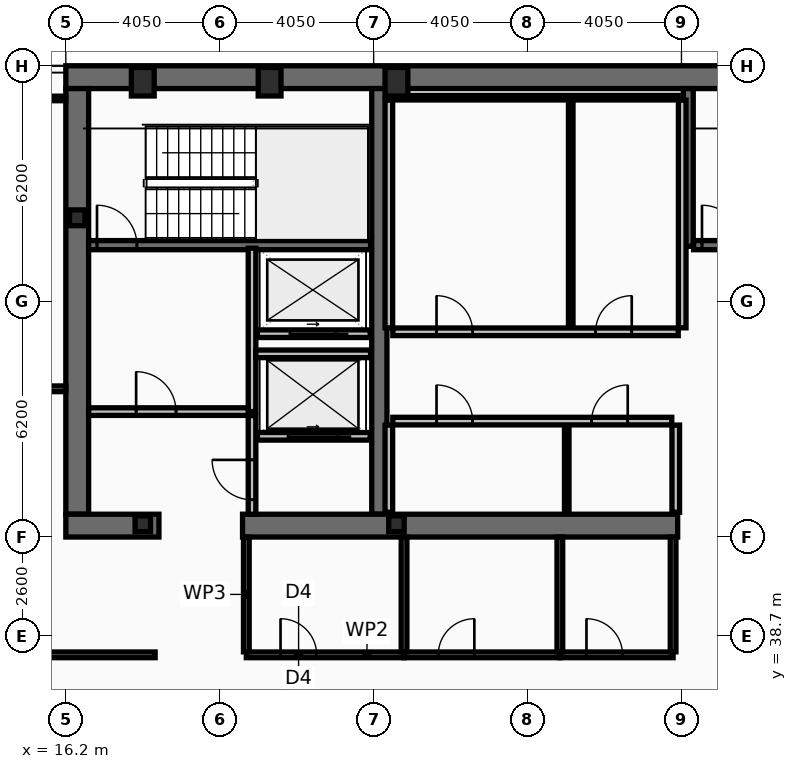
"""IFC4 building model, lengths in metres.
Left out: names, types, materials, properties, quantities, classifications, styles, units other than length and angle.
Written with IfcOpenShell. Run it as: python <this file> out.ifc"""

import sys

from ifc_helpers import new_model, si_unit, direction, frame, frame_2d, origin, origin_2d, place, context, subcontext, project, spatial, rectangle, hollow_rectangle, i_section, extrude, element, fill, save


model = new_model("IFC4")
c1 = context("Model", 3, precision=1e-05, world=origin(), true_north=direction((0.0, 1.0)))
c2 = subcontext(c1, "Body", "Model", "MODEL_VIEW")
j1 = project(units=[si_unit("LENGTHUNIT", "METRE"), si_unit("PLANEANGLEUNIT", "RADIAN")], contexts=[c1])
p1 = place(None, origin())
s1 = spatial("IfcSite", under=j1, at=p1, CompositionType="ELEMENT")
p2 = place(p1, origin())
s2 = spatial("IfcBuilding", under=s1, at=p2, CompositionType="ELEMENT")
p3 = place(p2, frame((0.0, 0.0, 206.6)))
s3 = spatial("IfcBuildingStorey", under=s2, at=p3, CompositionType="ELEMENT", Elevation=206.6)
p4 = place(p3, frame((16.2, 53.4, 0.0), z_axis=(0.0, 0.0, 1.0), x_axis=(1.0, 0.0, 0.0)))
e1 = element("IfcWall", 1, at=p4, inside=s3, PredefinedType="SHEAR", context=c2, shape_type="SweptSolid", body=[
    extrude(rectangle(XDim=40.5, YDim=0.6, at=frame_2d((20.25, 0.0))), origin(), (0.0, 0.0, 1.0), 3.44),
])
p5 = place(p3, frame((16.5, 41.9, 0.0), z_axis=(0.0, 0.0, 1.0), x_axis=(0.0, 1.0, 0.0)))
e2 = element("IfcWall", 2, at=p5, inside=s3, PredefinedType="SHEAR", context=c2, shape_type="SweptSolid", body=[
    extrude(rectangle(XDim=11.2, YDim=0.6, at=frame_2d((5.6, 0.0))), origin(), (0.0, 0.0, 1.0), 3.44),
])
p6 = place(p3, frame((24.45, 41.9, 0.0), z_axis=(0.0, 0.0, 1.0), x_axis=(0.0, 1.0, 0.0)))
e3 = element("IfcWall", 3, at=p6, inside=s3, PredefinedType="SHEAR", context=c2, shape_type="SweptSolid", body=[
    extrude(rectangle(XDim=11.2, YDim=0.4, at=frame_2d((5.6, 0.0))), origin(), (0.0, 0.0, 1.0), 3.44),
])
p7 = place(p3, frame((18.65, 41.6, 0.0), z_axis=(0.0, 0.0, 1.0), x_axis=(-1.0, 0.0, 0.0)))
e4 = element("IfcWall", 4, at=p7, inside=s3, PredefinedType="SHEAR", context=c2, shape_type="SweptSolid", body=[
    extrude(rectangle(XDim=2.45, YDim=0.6, at=frame_2d((1.225, 0.0))), origin(), (0.0, 0.0, 1.0), 3.44),
])
p8 = place(p3, frame((32.3, 41.6, 0.0), z_axis=(0.0, 0.0, 1.0), x_axis=(-1.0, 0.0, 0.0)))
e5 = element("IfcWall", 5, at=p8, inside=s3, PredefinedType="SHEAR", context=c2, shape_type="SweptSolid", body=[
    extrude(rectangle(XDim=11.45, YDim=0.6, at=frame_2d((5.725, 0.0))), origin(), (0.0, 0.0, 1.0), 3.44),
])
p9 = place(p3, frame((32.58, 48.95, 0.0), z_axis=(0.0, 0.0, 1.0), x_axis=(0.0, 1.0, 0.0)))
e6 = element("IfcWall", 6, at=p9, inside=s3, PredefinedType="SHEAR", context=c2, shape_type="SweptSolid", body=[
    extrude(rectangle(XDim=4.15, YDim=0.26, at=frame_2d((2.075, 0.0))), origin(), (0.0, 0.0, 1.0), 3.44),
])
p10 = place(p3, frame((16.8, 48.98, 0.0), z_axis=(0.0, 0.0, 1.0), x_axis=(1.0, 0.0, 0.0)))
e7 = element("IfcWall", 7, at=p10, inside=s3, PredefinedType="SHEAR", context=c2, shape_type="SweptSolid", body=[
    extrude(rectangle(XDim=7.42, YDim=0.24, at=frame_2d((3.71, 0.0))), origin(), (0.0, 0.0, 1.0), 3.44),
])
p11 = place(p10, frame((0.22, 0.0, 0.0)))
e8 = element("IfcOpeningElement", 8, at=p11, cuts=e7, PredefinedType="OPENING", context=c2, shape_type="SweptSolid", body=[
    extrude(rectangle(XDim=1.05, YDim=2.15, at=frame_2d((0.525, 1.075))), frame((0.0, 0.13, 0.0), z_axis=(0.0, -1.0, 0.0), x_axis=(1.0, 0.0, 0.0)), (0.0, 0.0, 1.0), 0.26),
])
p12 = place(p3, frame((32.72, 48.98, 0.0), z_axis=(0.0, 0.0, 1.0), x_axis=(1.0, 0.0, 0.0)))
e9 = element("IfcWall", 9, at=p12, inside=s3, PredefinedType="SHEAR", context=c2, shape_type="SweptSolid", body=[
    extrude(rectangle(XDim=7.56, YDim=0.24, at=frame_2d((3.78, 0.0))), origin(), (0.0, 0.0, 1.0), 3.44),
])
p13 = place(p12, frame((0.22, 0.0, 0.0)))
e10 = element("IfcOpeningElement", 10, at=p13, cuts=e9, PredefinedType="OPENING", context=c2, shape_type="SweptSolid", body=[
    extrude(rectangle(XDim=1.05, YDim=2.15, at=frame_2d((0.525, 1.075))), frame((0.0, 0.13, 0.0), z_axis=(0.0, -1.0, 0.0), x_axis=(1.0, 0.0, 0.0)), (0.0, 0.0, 1.0), 0.26),
])
for number, where, z_axis, x_axis in (
    (11, (18.225, 53.28, 0.0), (0.0, 0.0, 1.0), (1.0, 0.0, 0.0)),
    (12, (21.562, 53.28, 0.0), (0.0, 0.0, 1.0), (1.0, 0.0, 0.0)),
    (13, (24.9, 53.28, 0.0), (0.0, 0.0, 1.0), (1.0, 0.0, 0.0)),
):
    element("IfcColumn", number, at=place(p3, frame(where, z_axis=z_axis, x_axis=x_axis)), inside=s3, PredefinedType="COLUMN", context=c2, shape_type="SweptSolid", body=[
        extrude(hollow_rectangle(XDim=0.6, YDim=0.75, WallThickness=0.045, at=origin_2d()), origin(), (0.0, 0.0, 1.0), 3.6),
    ])
for number, where, z_axis, x_axis in (
    (14, (16.5, 49.7, 0.0), (0.0, 0.0, 1.0), (1.0, 0.0, 0.0)),
    (15, (18.225, 41.65, 0.0), (0.0, 0.0, 1.0), (1.0, 0.0, 0.0)),
    (16, (24.9, 41.65, 0.0), (0.0, 0.0, 1.0), (1.0, 0.0, 0.0)),
):
    element("IfcColumn", number, at=place(p3, frame(where, z_axis=z_axis, x_axis=x_axis)), inside=s3, PredefinedType="COLUMN", context=c2, shape_type="SweptSolid", body=[
        extrude(i_section(OverallWidth=0.406, OverallDepth=0.416, WebThickness=0.03, FlangeThickness=0.048, at=origin_2d()), origin(), (0.0, 0.0, 1.0), 3.6),
    ])
p14 = place(p3, frame((24.21, 43.95, 0.0), z_axis=(0.0, 0.0, 1.0), x_axis=(-1.0, 0.0, 0.0)))
e17 = element("IfcWall", 17, at=p14, inside=s3, PredefinedType="PARTITIONING", context=c2, shape_type="SweptSolid", body=[
    extrude(rectangle(XDim=2.97, YDim=0.2, at=frame_2d((1.485, 0.0))), origin(), (0.0, 0.0, 1.0), 3.44),
])
p15 = place(p14, frame((0.86, 0.0, 0.0)))
e18 = element("IfcOpeningElement", 18, at=p15, cuts=e17, PredefinedType="OPENING", context=c2, shape_type="SweptSolid", body=[
    extrude(rectangle(XDim=1.3, YDim=2.18, at=frame_2d((0.65, 1.09))), frame((0.0, 0.11, 0.0), z_axis=(0.0, -1.0, 0.0), x_axis=(1.0, 0.0, 0.0)), (0.0, 0.0, 1.0), 0.22),
])
p16 = place(p3, frame((24.21, 46.65, 0.0), z_axis=(0.0, 0.0, 1.0), x_axis=(-1.0, 0.0, 0.0)))
e19 = element("IfcWall", 19, at=p16, inside=s3, PredefinedType="PARTITIONING", context=c2, shape_type="SweptSolid", body=[
    extrude(rectangle(XDim=2.97, YDim=0.2, at=frame_2d((1.485, 0.0))), origin(), (0.0, 0.0, 1.0), 3.44),
])
p17 = place(p16, frame((0.91, 0.0, 0.0)))
e20 = element("IfcOpeningElement", 20, at=p17, cuts=e19, PredefinedType="OPENING", context=c2, shape_type="SweptSolid", body=[
    extrude(rectangle(XDim=1.2, YDim=2.18, at=frame_2d((0.6, 1.09))), frame((0.0, 0.11, 0.0), z_axis=(0.0, -1.0, 0.0), x_axis=(1.0, 0.0, 0.0)), (0.0, 0.0, 1.0), 0.22),
])
p18 = place(p3, frame((21.1, 44.6, 0.0), z_axis=(0.0, 0.0, 1.0), x_axis=(0.0, 1.0, 0.0)))
e21 = element("IfcWall", 21, at=p18, inside=s3, PredefinedType="PARTITIONING", context=c2, shape_type="SweptSolid", body=[
    extrude(rectangle(XDim=4.3, YDim=0.2, at=frame_2d((2.15, 0.0))), origin(), (0.0, 0.0, 1.0), 3.44),
])
p19 = place(p3, frame((16.8, 44.6, 0.0), z_axis=(0.0, 0.0, 1.0), x_axis=(1.0, 0.0, 0.0)))
e22 = element("IfcWall", 22, at=p19, inside=s3, PredefinedType="PARTITIONING", context=c2, shape_type="SweptSolid", body=[
    extrude(rectangle(XDim=4.2, YDim=0.2, at=frame_2d((2.1, 0.0))), origin(), (0.0, 0.0, 1.0), 3.44),
])
p20 = place(p19, frame((1.25, 0.0, 0.0)))
e23 = element("IfcOpeningElement", 23, at=p20, cuts=e22, PredefinedType="OPENING", context=c2, shape_type="SweptSolid", body=[
    extrude(rectangle(XDim=1.05, YDim=2.15, at=frame_2d((0.525, 1.075))), frame((0.0, 0.11, 0.0), z_axis=(0.0, -1.0, 0.0), x_axis=(1.0, 0.0, 0.0)), (0.0, 0.0, 1.0), 0.22),
])
p21 = place(p3, frame((21.2, 46.12, 0.0), z_axis=(0.0, 0.0, 1.0), x_axis=(1.0, 0.0, 0.0)))
e24 = element("IfcWall", 24, at=p21, inside=s3, PredefinedType="PARTITIONING", context=c2, shape_type="SweptSolid", body=[
    extrude(rectangle(XDim=3.02, YDim=0.2, at=frame_2d((1.51, 0.0))), origin(), (0.0, 0.0, 1.0), 3.44),
])
p22 = place(p3, frame((21.1, 41.9, 0.0), z_axis=(0.0, 0.0, 1.0), x_axis=(0.0, 1.0, 0.0)))
e25 = element("IfcWall", 25, at=p22, inside=s3, PredefinedType="PARTITIONING", context=c2, shape_type="SweptSolid", body=[
    extrude(rectangle(XDim=2.595, YDim=0.2, at=frame_2d((1.298, 0.0))), origin(), (0.0, 0.0, 1.0), 3.44),
])
p23 = place(p22, frame((0.38, 0.0, 0.0)))
e26 = element("IfcOpeningElement", 26, at=p23, cuts=e25, PredefinedType="OPENING", context=c2, shape_type="SweptSolid", body=[
    extrude(rectangle(XDim=1.05, YDim=2.15, at=frame_2d((0.525, 1.075))), frame((0.0, 0.11, 0.0), z_axis=(0.0, -1.0, 0.0), x_axis=(1.0, 0.0, 0.0)), (0.0, 0.0, 1.0), 0.22),
])
for number, where, z_axis, x_axis in (
    (27, (24.7, 46.805, 0.0), (0.0, 0.0, 1.0), (0.0, 1.0, 0.0)),
    (28, (32.42, 46.805, 0.0), (0.0, 0.0, 1.0), (0.0, 1.0, 0.0)),
):
    element("IfcWall", number, at=place(p3, frame(where, z_axis=z_axis, x_axis=x_axis)), inside=s3, PredefinedType="PARTITIONING", context=c2, shape_type="SweptSolid", body=[
        extrude(rectangle(XDim=5.99, YDim=0.2, at=frame_2d((2.995, 0.0))), origin(), (0.0, 0.0, 1.0), 3.44),
    ])
p24 = place(p3, frame((24.805, 52.86, 0.0), z_axis=(0.0, 0.0, 1.0), x_axis=(1.0, 0.0, 0.0)))
e29 = element("IfcWall", 29, at=p24, inside=s3, PredefinedType="PARTITIONING", context=c2, shape_type="SweptSolid", body=[
    extrude(rectangle(XDim=7.51, YDim=0.12, at=frame_2d((3.755, 0.0))), origin(), (0.0, 0.0, 1.0), 3.44),
])
p25 = place(p3, frame((29.486, 46.805, 0.0), z_axis=(0.0, 0.0, 1.0), x_axis=(0.0, 1.0, 0.0)))
e30 = element("IfcWall", 30, at=p25, inside=s3, PredefinedType="PARTITIONING", context=c2, shape_type="SweptSolid", body=[
    extrude(rectangle(XDim=5.99, YDim=0.12, at=frame_2d((2.995, 0.0))), origin(), (0.0, 0.0, 1.0), 3.44),
])
p26 = place(p3, frame((24.805, 46.7, 0.0), z_axis=(0.0, 0.0, 1.0), x_axis=(1.0, 0.0, 0.0)))
e31 = element("IfcWall", 31, at=p26, inside=s3, PredefinedType="PARTITIONING", context=c2, shape_type="SweptSolid", body=[
    extrude(rectangle(XDim=7.51, YDim=0.2, at=frame_2d((3.755, 0.0))), origin(), (0.0, 0.0, 1.0), 3.44),
])
p27 = place(p26, frame((1.15, 0.0, 0.0)))
e32 = element("IfcOpeningElement", 32, at=p27, cuts=e31, PredefinedType="OPENING", context=c2, shape_type="SweptSolid", body=[
    extrude(rectangle(XDim=0.95, YDim=2.1, at=frame_2d((0.475, 1.05))), frame((0.0, 0.11, 0.0), z_axis=(0.0, -1.0, 0.0), x_axis=(1.0, 0.0, 0.0)), (0.0, 0.0, 1.0), 0.22),
])
p28 = place(p26, frame((5.336, 0.0, 0.0)))
e33 = element("IfcOpeningElement", 33, at=p28, cuts=e31, PredefinedType="OPENING", context=c2, shape_type="SweptSolid", body=[
    extrude(rectangle(XDim=0.95, YDim=2.1, at=frame_2d((0.475, 1.05))), frame((0.0, 0.11, 0.0), z_axis=(0.0, -1.0, 0.0), x_axis=(1.0, 0.0, 0.0)), (0.0, 0.0, 1.0), 0.22),
])
for number, where, z_axis, x_axis in (
    (34, (24.7, 41.95, 0.0), (0.0, 0.0, 1.0), (0.0, 1.0, 0.0)),
    (35, (32.25, 41.95, 0.0), (0.0, 0.0, 1.0), (0.0, 1.0, 0.0)),
):
    element("IfcWall", number, at=place(p3, frame(where, z_axis=z_axis, x_axis=x_axis)), inside=s3, PredefinedType="PARTITIONING", context=c2, shape_type="SweptSolid", body=[
        extrude(rectangle(XDim=2.295, YDim=0.2, at=frame_2d((1.147, 0.0))), origin(), (0.0, 0.0, 1.0), 3.44),
    ])
p29 = place(p3, frame((29.381, 41.95, 0.0), z_axis=(0.0, 0.0, 1.0), x_axis=(0.0, 1.0, 0.0)))
e36 = element("IfcWall", 36, at=p29, inside=s3, PredefinedType="PARTITIONING", context=c2, shape_type="SweptSolid", body=[
    extrude(rectangle(XDim=2.295, YDim=0.12, at=frame_2d((1.147, 0.0))), origin(), (0.0, 0.0, 1.0), 3.44),
])
p30 = place(p3, frame((24.805, 44.35, 0.0), z_axis=(0.0, 0.0, 1.0), x_axis=(1.0, 0.0, 0.0)))
e37 = element("IfcWall", 37, at=p30, inside=s3, PredefinedType="PARTITIONING", context=c2, shape_type="SweptSolid", body=[
    extrude(rectangle(XDim=7.34, YDim=0.2, at=frame_2d((3.67, 0.0))), origin(), (0.0, 0.0, 1.0), 3.44),
])
p31 = place(p30, frame((1.15, 0.0, 0.0)))
e38 = element("IfcOpeningElement", 38, at=p31, cuts=e37, PredefinedType="OPENING", context=c2, shape_type="SweptSolid", body=[
    extrude(rectangle(XDim=0.95, YDim=2.1, at=frame_2d((0.475, 1.05))), frame((0.0, 0.11, 0.0), z_axis=(0.0, -1.0, 0.0), x_axis=(1.0, 0.0, 0.0)), (0.0, 0.0, 1.0), 0.22),
])
p32 = place(p30, frame((5.231, 0.0, 0.0)))
e39 = element("IfcOpeningElement", 39, at=p32, cuts=e37, PredefinedType="OPENING", context=c2, shape_type="SweptSolid", body=[
    extrude(rectangle(XDim=0.95, YDim=2.1, at=frame_2d((0.475, 1.05))), frame((0.0, 0.11, 0.0), z_axis=(0.0, -1.0, 0.0), x_axis=(1.0, 0.0, 0.0)), (0.0, 0.0, 1.0), 0.22),
])
p33 = place(p3, frame((20.95, 38.2, 0.0), z_axis=(0.0, 0.0, 1.0), x_axis=(1.0, 0.0, 0.0)))
e40 = element("IfcWall", 40, at=p33, inside=s3, PredefinedType="PARTITIONING", context=c2, shape_type="SweptSolid", body=[
    extrude(rectangle(XDim=4.15, YDim=0.15, at=frame_2d((2.075, 0.0))), origin(), (0.0, 0.0, 1.0), 2.73),
])
p34 = place(p33, frame((0.9, 0.0, 0.0)))
e41 = element("IfcOpeningElement", 41, at=p34, cuts=e40, PredefinedType="OPENING", context=c2, shape_type="SweptSolid", body=[
    extrude(rectangle(XDim=0.95, YDim=2.05, at=frame_2d((0.475, 1.025))), frame((0.0, 0.085, 0.0), z_axis=(0.0, -1.0, 0.0), x_axis=(1.0, 0.0, 0.0)), (0.0, 0.0, 1.0), 0.17),
])
p35 = place(p3, frame((25.1, 38.2, 0.0), z_axis=(0.0, 0.0, 1.0), x_axis=(1.0, 0.0, 0.0)))
e42 = element("IfcWall", 42, at=p35, inside=s3, PredefinedType="PARTITIONING", context=c2, shape_type="SweptSolid", body=[
    extrude(rectangle(XDim=4.1, YDim=0.15, at=frame_2d((2.05, 0.0))), origin(), (0.0, 0.0, 1.0), 2.73),
])
p36 = place(p35, frame((0.9, 0.0, 0.0)))
e43 = element("IfcOpeningElement", 43, at=p36, cuts=e42, PredefinedType="OPENING", context=c2, shape_type="SweptSolid", body=[
    extrude(rectangle(XDim=0.95, YDim=2.05, at=frame_2d((0.475, 1.025))), frame((0.0, 0.085, 0.0), z_axis=(0.0, -1.0, 0.0), x_axis=(1.0, 0.0, 0.0)), (0.0, 0.0, 1.0), 0.17),
])
p37 = place(p3, frame((29.2, 38.2, 0.0), z_axis=(0.0, 0.0, 1.0), x_axis=(1.0, 0.0, 0.0)))
e44 = element("IfcWall", 44, at=p37, inside=s3, PredefinedType="PARTITIONING", context=c2, shape_type="SweptSolid", body=[
    extrude(rectangle(XDim=2.98, YDim=0.15, at=frame_2d((1.49, 0.0))), origin(), (0.0, 0.0, 1.0), 2.73),
])
p38 = place(p37, frame((0.7, 0.0, 0.0)))
e45 = element("IfcOpeningElement", 45, at=p38, cuts=e44, PredefinedType="OPENING", context=c2, shape_type="SweptSolid", body=[
    extrude(rectangle(XDim=0.95, YDim=2.05, at=frame_2d((0.475, 1.025))), frame((0.0, 0.085, 0.0), z_axis=(0.0, -1.0, 0.0), x_axis=(1.0, 0.0, 0.0)), (0.0, 0.0, 1.0), 0.17),
])
p39 = place(p3, frame((20.95, 38.28, 0.0), z_axis=(0.0, 0.0, 1.0), x_axis=(0.0, 1.0, 0.0)))
e46 = element("IfcWall", 46, at=p39, inside=s3, PredefinedType="PARTITIONING", context=c2, shape_type="SweptSolid", body=[
    extrude(rectangle(XDim=3.02, YDim=0.15, at=frame_2d((1.51, 0.0))), origin(), (0.0, 0.0, 1.0), 3.44),
])
p40 = place(p3, frame((25.1, 38.28, 0.0), z_axis=(0.0, 0.0, 1.0), x_axis=(0.0, 1.0, 0.0)))
e47 = element("IfcWall", 47, at=p40, inside=s3, PredefinedType="PARTITIONING", context=c2, shape_type="SweptSolid", body=[
    extrude(rectangle(XDim=3.02, YDim=0.15, at=frame_2d((1.51, 0.0))), origin(), (0.0, 0.0, 1.0), 2.73),
])
for number, where, z_axis, x_axis in (
    (48, (29.2, 38.28, 0.0), (0.0, 0.0, 1.0), (0.0, 1.0, 0.0)),
    (49, (32.18, 38.28, 0.0), (0.0, 0.0, 1.0), (0.0, 1.0, 0.0)),
):
    element("IfcWall", number, at=place(p3, frame(where, z_axis=z_axis, x_axis=x_axis)), inside=s3, PredefinedType="PARTITIONING", context=c2, shape_type="SweptSolid", body=[
        extrude(rectangle(XDim=3.02, YDim=0.15, at=frame_2d((1.51, 0.0))), origin(), (0.0, 0.0, 1.0), 3.44),
    ])
p41 = place(p3, frame((8.03, 38.2, 0.0), z_axis=(0.0, 0.0, 1.0), x_axis=(1.0, 0.0, 0.0)))
e50 = element("IfcWall", 50, at=p41, inside=s3, PredefinedType="PARTITIONING", context=c2, shape_type="SweptSolid", body=[
    extrude(rectangle(XDim=10.52, YDim=0.15, at=frame_2d((5.26, 0.0))), origin(), (0.0, 0.0, 1.0), 2.73),
])
p42 = place(p41, frame((6.32, 0.0, 0.0)))
e51 = element("IfcOpeningElement", 51, at=p42, cuts=e50, PredefinedType="OPENING", context=c2, shape_type="SweptSolid", body=[
    extrude(rectangle(XDim=0.95, YDim=2.05, at=frame_2d((0.475, 1.025))), frame((0.0, 0.085, 0.0), z_axis=(0.0, -1.0, 0.0), x_axis=(1.0, 0.0, 0.0)), (0.0, 0.0, 1.0), 0.17),
])
p43 = place(p3, frame((8.095, 45.2, 0.0), z_axis=(0.0, 0.0, 1.0), x_axis=(1.0, 0.0, 0.0)))
e52 = element("IfcWall", 52, at=p43, inside=s3, PredefinedType="PARTITIONING", context=c2, shape_type="SweptSolid", body=[
    extrude(rectangle(XDim=8.105, YDim=0.15, at=frame_2d((4.052, 0.0))), origin(), (0.0, 0.0, 1.0), 2.83),
])
p44 = place(p43, frame((6.32, 0.0, 0.0)))
e53 = element("IfcOpeningElement", 53, at=p44, cuts=e52, PredefinedType="OPENING", context=c2, shape_type="SweptSolid", body=[
    extrude(rectangle(XDim=0.9, YDim=2.05, at=frame_2d((0.45, 1.025))), frame((0.0, 0.085, 0.0), z_axis=(0.0, -1.0, 0.0), x_axis=(1.0, 0.0, 0.0)), (0.0, 0.0, 1.0), 0.17),
])
p45 = place(p3, frame((8.095, 52.84, 0.0), z_axis=(0.0, 0.0, 1.0), x_axis=(1.0, 0.0, 0.0)))
e54 = element("IfcWall", 54, at=p45, inside=s3, PredefinedType="PARTITIONING", context=c2, shape_type="SweptSolid", body=[
    extrude(rectangle(XDim=8.105, YDim=0.12, at=frame_2d((4.052, 0.0))), origin(), (0.0, 0.0, 1.0), 3.44),
])
p46 = place(p11, origin())
e55 = element("IfcDoor", 55, at=p46, inside=s3, OperationType="SINGLE_SWING_LEFT", PredefinedType="DOOR", context=c2, shape_type="SweptSolid", body=[
    extrude(rectangle(XDim=1.05, YDim=2.15, at=frame_2d((0.525, 1.075))), frame((0.0, 0.025, 0.0), z_axis=(0.0, -1.0, 0.0), x_axis=(1.0, 0.0, 0.0)), (0.0, 0.0, 1.0), 0.05),
])
fill(e8, e55)
p47 = place(p13, origin())
e56 = element("IfcDoor", 56, at=p47, inside=s3, OperationType="SINGLE_SWING_LEFT", PredefinedType="DOOR", context=c2, shape_type="SweptSolid", body=[
    extrude(rectangle(XDim=1.05, YDim=2.15, at=frame_2d((0.525, 1.075))), frame((0.0, 0.025, 0.0), z_axis=(0.0, -1.0, 0.0), x_axis=(1.0, 0.0, 0.0)), (0.0, 0.0, 1.0), 0.05),
])
fill(e10, e56)
p48 = place(p15, origin())
e57 = element("IfcDoor", 57, at=p48, inside=s3, OperationType="SLIDING_TO_LEFT", PredefinedType="DOOR", context=c2, shape_type="SweptSolid", body=[
    extrude(rectangle(XDim=1.3, YDim=2.18, at=frame_2d((0.65, 1.09))), frame((0.0, 0.025, 0.0), z_axis=(0.0, -1.0, 0.0), x_axis=(1.0, 0.0, 0.0)), (0.0, 0.0, 1.0), 0.05),
])
fill(e18, e57)
p49 = place(p17, origin())
e58 = element("IfcDoor", 58, at=p49, inside=s3, OperationType="SLIDING_TO_LEFT", PredefinedType="DOOR", context=c2, shape_type="SweptSolid", body=[
    extrude(rectangle(XDim=1.2, YDim=2.18, at=frame_2d((0.6, 1.09))), frame((0.0, 0.025, 0.0), z_axis=(0.0, -1.0, 0.0), x_axis=(1.0, 0.0, 0.0)), (0.0, 0.0, 1.0), 0.05),
])
fill(e20, e58)
p50 = place(p20, origin())
e59 = element("IfcDoor", 59, at=p50, inside=s3, OperationType="SINGLE_SWING_LEFT", PredefinedType="DOOR", context=c2, shape_type="SweptSolid", body=[
    extrude(rectangle(XDim=1.05, YDim=2.15, at=frame_2d((0.525, 1.075))), frame((0.0, 0.025, 0.0), z_axis=(0.0, -1.0, 0.0), x_axis=(1.0, 0.0, 0.0)), (0.0, 0.0, 1.0), 0.05),
])
fill(e23, e59)
p51 = place(p23, origin())
e60 = element("IfcDoor", 60, at=p51, inside=s3, OperationType="SINGLE_SWING_RIGHT", PredefinedType="DOOR", context=c2, shape_type="SweptSolid", body=[
    extrude(rectangle(XDim=1.05, YDim=2.15, at=frame_2d((0.525, 1.075))), frame((0.0, 0.025, 0.0), z_axis=(0.0, -1.0, 0.0), x_axis=(1.0, 0.0, 0.0)), (0.0, 0.0, 1.0), 0.05),
])
fill(e26, e60)
p52 = place(p27, origin())
e61 = element("IfcDoor", 61, at=p52, inside=s3, OperationType="SINGLE_SWING_LEFT", PredefinedType="DOOR", context=c2, shape_type="SweptSolid", body=[
    extrude(rectangle(XDim=0.95, YDim=2.1, at=frame_2d((0.475, 1.05))), frame((0.0, 0.025, 0.0), z_axis=(0.0, -1.0, 0.0), x_axis=(1.0, 0.0, 0.0)), (0.0, 0.0, 1.0), 0.05),
])
fill(e32, e61)
p53 = place(p28, origin())
e62 = element("IfcDoor", 62, at=p53, inside=s3, OperationType="SINGLE_SWING_RIGHT", PredefinedType="DOOR", context=c2, shape_type="SweptSolid", body=[
    extrude(rectangle(XDim=0.95, YDim=2.1, at=frame_2d((0.475, 1.05))), frame((0.0, 0.025, 0.0), z_axis=(0.0, -1.0, 0.0), x_axis=(1.0, 0.0, 0.0)), (0.0, 0.0, 1.0), 0.05),
])
fill(e33, e62)
p54 = place(p31, origin())
e63 = element("IfcDoor", 63, at=p54, inside=s3, OperationType="SINGLE_SWING_LEFT", PredefinedType="DOOR", context=c2, shape_type="SweptSolid", body=[
    extrude(rectangle(XDim=0.95, YDim=2.1, at=frame_2d((0.475, 1.05))), frame((0.0, 0.025, 0.0), z_axis=(0.0, -1.0, 0.0), x_axis=(1.0, 0.0, 0.0)), (0.0, 0.0, 1.0), 0.05),
])
fill(e38, e63)
p55 = place(p32, origin())
e64 = element("IfcDoor", 64, at=p55, inside=s3, OperationType="SINGLE_SWING_RIGHT", PredefinedType="DOOR", context=c2, shape_type="SweptSolid", body=[
    extrude(rectangle(XDim=0.95, YDim=2.1, at=frame_2d((0.475, 1.05))), frame((0.0, 0.025, 0.0), z_axis=(0.0, -1.0, 0.0), x_axis=(1.0, 0.0, 0.0)), (0.0, 0.0, 1.0), 0.05),
])
fill(e39, e64)
p56 = place(p34, origin())
e65 = element("IfcDoor", 65, at=p56, inside=s3, OperationType="SINGLE_SWING_LEFT", PredefinedType="DOOR", context=c2, shape_type="SweptSolid", body=[
    extrude(rectangle(XDim=0.95, YDim=2.05, at=frame_2d((0.475, 1.025))), frame((0.0, 0.025, 0.0), z_axis=(0.0, -1.0, 0.0), x_axis=(1.0, 0.0, 0.0)), (0.0, 0.0, 1.0), 0.05),
])
fill(e41, e65)
p57 = place(p36, origin())
e66 = element("IfcDoor", 66, at=p57, inside=s3, OperationType="SINGLE_SWING_RIGHT", PredefinedType="DOOR", context=c2, shape_type="SweptSolid", body=[
    extrude(rectangle(XDim=0.95, YDim=2.05, at=frame_2d((0.475, 1.025))), frame((0.0, 0.025, 0.0), z_axis=(0.0, -1.0, 0.0), x_axis=(1.0, 0.0, 0.0)), (0.0, 0.0, 1.0), 0.05),
])
fill(e43, e66)
p58 = place(p38, origin())
e67 = element("IfcDoor", 67, at=p58, inside=s3, OperationType="SINGLE_SWING_LEFT", PredefinedType="DOOR", context=c2, shape_type="SweptSolid", body=[
    extrude(rectangle(XDim=0.95, YDim=2.05, at=frame_2d((0.475, 1.025))), frame((0.0, 0.025, 0.0), z_axis=(0.0, -1.0, 0.0), x_axis=(1.0, 0.0, 0.0)), (0.0, 0.0, 1.0), 0.05),
])
fill(e45, e67)
save(model, sys.argv[1])
